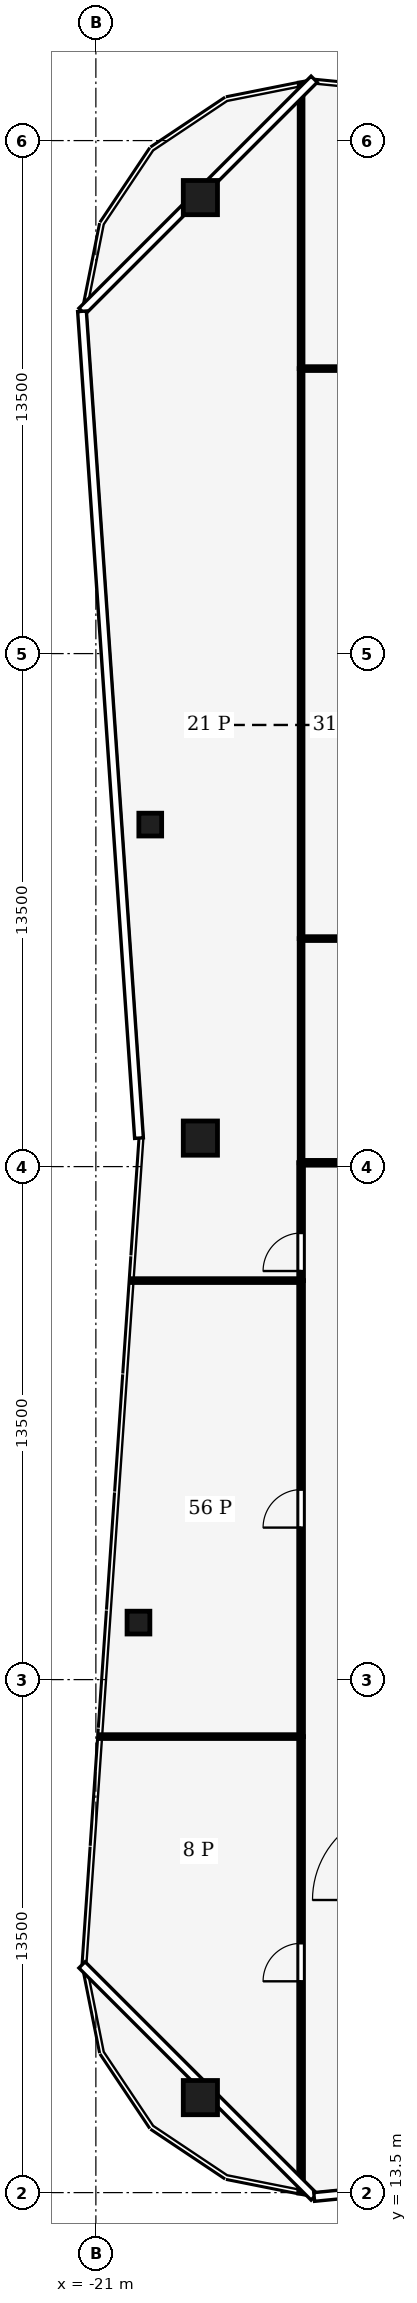
"""IFC4 building model, lengths in metres.
Left out: names, types, materials, properties, quantities, classifications, styles, units other than length and angle.
Written with IfcOpenShell. Run it as: python <this file> out.ifc"""

import sys

from ifc_helpers import new_model, si_unit, direction, frame, frame_2d, origin, origin_2d, place, context, subcontext, project, spatial, rectangle, hollow_rectangle, extrude, element, fill, save


model = new_model("IFC4")
c1 = context("Model", 3, precision=1e-05, world=origin(), true_north=direction((0.0, 1.0)))
c2 = subcontext(c1, "Body", "Model", "MODEL_VIEW")
j1 = project(units=[si_unit("LENGTHUNIT", "METRE"), si_unit("PLANEANGLEUNIT", "RADIAN")], contexts=[c1])
p1 = place(None, origin())
s1 = spatial("IfcSite", under=j1, at=p1, CompositionType="ELEMENT")
p2 = place(p1, origin())
s2 = spatial("IfcBuilding", under=s1, at=p2, CompositionType="ELEMENT")
p3 = place(p2, frame((0.0, 0.0, 334.0)))
s3 = spatial("IfcBuildingStorey", under=s2, at=p3, CompositionType="ELEMENT", Elevation=334.0)
for number, where, z_axis, x_axis in (
    (1, (-18.25, 66.0, 0.0), (0.0, 0.0, 1.0), (1.0, 0.0, 0.0)),
    (2, (-18.25, 16.0, 0.0), (0.0, 0.0, 1.0), (1.0, 0.0, 0.0)),
    (3, (-18.25, 41.25, 0.0), (0.0, 0.0, 1.0), (1.0, 0.0, 0.0)),
):
    element("IfcColumn", number, at=place(p3, frame(where, z_axis=z_axis, x_axis=x_axis)), inside=s3, PredefinedType="COLUMN", context=c2, shape_type="SweptSolid", body=[
        extrude(hollow_rectangle(XDim=0.9, YDim=0.9, WallThickness=0.04, at=origin_2d()), origin(), (0.0, 0.0, 1.0), 6.5),
    ])
for number, where, z_axis, x_axis in (
    (4, (-19.879, 28.5, 0.0), (0.0, 0.0, 1.0), (1.0, 0.0, 0.0)),
    (5, (-19.569, 49.5, 0.0), (0.0, 0.0, 1.0), (1.0, 0.0, 0.0)),
):
    element("IfcColumn", number, at=place(p3, frame(where, z_axis=z_axis, x_axis=x_axis)), inside=s3, PredefinedType="COLUMN", context=c2, shape_type="SweptSolid", body=[
        extrude(hollow_rectangle(XDim=0.6, YDim=0.6, WallThickness=0.025, at=origin_2d()), origin(), (0.0, 0.0, 1.0), 6.5),
    ])
p4 = place(p3, frame((-15.6, 13.49, 0.0), z_axis=(0.0, 0.0, 1.0), x_axis=(0.0, 1.0, 0.0)))
e6 = element("IfcWall", 6, at=p4, inside=s3, PredefinedType="PARTITIONING", context=c2, shape_type="SweptSolid", body=[
    extrude(rectangle(XDim=12.01, YDim=0.125, at=frame_2d((6.005, 0.0))), origin(), (0.0, 0.0, 1.0), 5.41),
])
p5 = place(p4, frame((5.571, 0.0, 0.0)))
e7 = element("IfcOpeningElement", 7, at=p5, cuts=e6, PredefinedType="OPENING", context=c2, shape_type="SweptSolid", body=[
    extrude(rectangle(XDim=1.0, YDim=2.1, at=frame_2d((0.5, 1.05))), frame((0.0, 0.073, 0.0), z_axis=(0.0, -1.0, 0.0), x_axis=(1.0, 0.0, 0.0)), (0.0, 0.0, 1.0), 0.145),
])
p6 = place(p3, frame((-15.6, 25.5, 0.0), z_axis=(0.0, 0.0, 1.0), x_axis=(0.0, 1.0, 0.0)))
e8 = element("IfcWall", 8, at=p6, inside=s3, PredefinedType="PARTITIONING", context=c2, shape_type="SweptSolid", body=[
    extrude(rectangle(XDim=12.0, YDim=0.125, at=frame_2d((6.0, 0.0))), origin(), (0.0, 0.0, 1.0), 6.02),
])
p7 = place(p6, frame((5.5, 0.0, 0.0)))
e9 = element("IfcOpeningElement", 9, at=p7, cuts=e8, PredefinedType="OPENING", context=c2, shape_type="SweptSolid", body=[
    extrude(rectangle(XDim=1.0, YDim=2.1, at=frame_2d((0.5, 1.05))), frame((0.0, 0.073, 0.0), z_axis=(0.0, -1.0, 0.0), x_axis=(1.0, 0.0, 0.0)), (0.0, 0.0, 1.0), 0.145),
])
p8 = place(p3, frame((-15.6, 37.5, 0.0), z_axis=(0.0, 0.0, 1.0), x_axis=(0.0, 1.0, 0.0)))
e10 = element("IfcWall", 10, at=p8, inside=s3, PredefinedType="PARTITIONING", context=c2, shape_type="SweptSolid", body=[
    extrude(rectangle(XDim=3.104, YDim=0.125, at=frame_2d((1.552, 0.0))), origin(), (0.0, 0.0, 1.0), 5.62),
])
p9 = place(p8, frame((0.252, 0.0, 0.0)))
e11 = element("IfcOpeningElement", 11, at=p9, cuts=e10, PredefinedType="OPENING", context=c2, shape_type="SweptSolid", body=[
    extrude(rectangle(XDim=1.0, YDim=2.1, at=frame_2d((0.5, 1.05))), frame((0.0, 0.073, 0.0), z_axis=(0.0, -1.0, 0.0), x_axis=(1.0, 0.0, 0.0)), (0.0, 0.0, 1.0), 0.145),
])
p10 = place(p3, frame((-15.6, 40.6, 0.0), z_axis=(0.0, 0.0, 1.0), x_axis=(1.0, 0.0, 0.0)))
e12 = element("IfcWall", 12, at=p10, inside=s3, PredefinedType="PARTITIONING", context=c2, shape_type="SweptSolid", body=[
    extrude(rectangle(XDim=9.6, YDim=0.125, at=frame_2d((4.8, 0.0))), origin(), (0.0, 0.0, 1.0), 5.87),
])
p11 = place(p10, frame((4.3, 0.0, 0.0)))
e13 = element("IfcOpeningElement", 13, at=p11, cuts=e12, PredefinedType="OPENING", context=c2, shape_type="SweptSolid", body=[
    extrude(rectangle(XDim=1.0, YDim=2.1, at=frame_2d((0.5, 1.05))), frame((0.0, 0.073, 0.0), z_axis=(0.0, -1.0, 0.0), x_axis=(1.0, 0.0, 0.0)), (0.0, 0.0, 1.0), 0.145),
])
p12 = place(p3, frame((-15.6, 25.5, 0.0), z_axis=(0.0, 0.0, 1.0), x_axis=(-1.0, 0.0, 0.0)))
e14 = element("IfcWall", 14, at=p12, inside=s3, PredefinedType="PARTITIONING", context=c2, shape_type="SweptSolid", body=[
    extrude(rectangle(XDim=5.316, YDim=0.1, at=frame_2d((2.658, 0.0))), origin(), (0.0, 0.0, 1.0), 5.52),
])
p13 = place(p3, frame((-15.6, 37.5, 0.0), z_axis=(0.0, 0.0, 1.0), x_axis=(-1.0, 0.0, 0.0)))
e15 = element("IfcWall", 15, at=p13, inside=s3, PredefinedType="PARTITIONING", context=c2, shape_type="SweptSolid", body=[
    extrude(rectangle(XDim=4.489, YDim=0.1, at=frame_2d((2.244, 0.0))), origin(), (0.0, 0.0, 1.0), 5.52),
])
p14 = place(p3, frame((-15.6, 40.6, 0.0), z_axis=(0.0, 0.0, 1.0), x_axis=(0.0, 1.0, 0.0)))
e16 = element("IfcWall", 16, at=p14, inside=s3, PredefinedType="PARTITIONING", context=c2, shape_type="SweptSolid", body=[
    extrude(rectangle(XDim=5.9, YDim=0.1, at=frame_2d((2.95, 0.0))), origin(), (0.0, 0.0, 1.0), 6.35),
])
p15 = place(p3, frame((-15.6, 46.5, 0.0), z_axis=(0.0, 0.0, 1.0), x_axis=(0.0, 1.0, 0.0)))
e17 = element("IfcWall", 17, at=p15, inside=s3, PredefinedType="PARTITIONING", context=c2, shape_type="SweptSolid", body=[
    extrude(rectangle(XDim=15.0, YDim=0.1, at=frame_2d((7.5, 0.0))), origin(), (0.0, 0.0, 1.0), 5.83),
])
p16 = place(p3, frame((-15.6, 61.5, 0.0), z_axis=(0.0, 0.0, 1.0), x_axis=(0.0, 1.0, 0.0)))
e18 = element("IfcWall", 18, at=p16, inside=s3, PredefinedType="PARTITIONING", context=c2, shape_type="SweptSolid", body=[
    extrude(rectangle(XDim=7.51, YDim=0.1, at=frame_2d((3.755, 0.0))), origin(), (0.0, 0.0, 1.0), 5.41),
])
p17 = place(p3, frame((-5.996, 46.5, 0.0), z_axis=(0.0, 0.0, 1.0), x_axis=(-1.0, 0.0, 0.0)))
e19 = element("IfcWall", 19, at=p17, inside=s3, PredefinedType="PARTITIONING", context=c2, shape_type="SweptSolid", body=[
    extrude(rectangle(XDim=9.604, YDim=0.1, at=frame_2d((4.802, 0.0))), origin(), (0.0, 0.0, 1.0), 5.87),
])
p18 = place(p3, frame((-15.6, 61.5, 0.0), z_axis=(0.0, 0.0, 1.0), x_axis=(1.0, 0.0, 0.0)))
e20 = element("IfcWall", 20, at=p18, inside=s3, PredefinedType="PARTITIONING", context=c2, shape_type="SweptSolid", body=[
    extrude(rectangle(XDim=9.6, YDim=0.1, at=frame_2d((4.8, 0.0))), origin(), (0.0, 0.0, 1.0), 5.72),
])
p19 = place(p18, frame((4.3, 0.0, 0.0)))
e21 = element("IfcOpeningElement", 21, at=p19, cuts=e20, PredefinedType="OPENING", context=c2, shape_type="SweptSolid", body=[
    extrude(rectangle(XDim=1.0, YDim=2.1, at=frame_2d((0.5, 1.05))), frame((0.0, 0.06, 0.0), z_axis=(0.0, -1.0, 0.0), x_axis=(1.0, 0.0, 0.0)), (0.0, 0.0, 1.0), 0.12),
])
p20 = place(p5, origin())
e22 = element("IfcDoor", 22, at=p20, inside=s3, OperationType="SINGLE_SWING_RIGHT", PredefinedType="DOOR", context=c2, shape_type="SweptSolid", body=[
    extrude(rectangle(XDim=1.0, YDim=2.1, at=frame_2d((0.5, 1.05))), frame((0.0, 0.025, 0.0), z_axis=(0.0, -1.0, 0.0), x_axis=(1.0, 0.0, 0.0)), (0.0, 0.0, 1.0), 0.05),
])
fill(e7, e22)
p21 = place(p7, origin())
e23 = element("IfcDoor", 23, at=p21, inside=s3, OperationType="SINGLE_SWING_RIGHT", PredefinedType="DOOR", context=c2, shape_type="SweptSolid", body=[
    extrude(rectangle(XDim=1.0, YDim=2.1, at=frame_2d((0.5, 1.05))), frame((0.0, 0.025, 0.0), z_axis=(0.0, -1.0, 0.0), x_axis=(1.0, 0.0, 0.0)), (0.0, 0.0, 1.0), 0.05),
])
fill(e9, e23)
p22 = place(p9, origin())
e24 = element("IfcDoor", 24, at=p22, inside=s3, OperationType="SINGLE_SWING_LEFT", PredefinedType="DOOR", context=c2, shape_type="SweptSolid", body=[
    extrude(rectangle(XDim=1.0, YDim=2.1, at=frame_2d((0.5, 1.05))), frame((0.0, 0.025, 0.0), z_axis=(0.0, -1.0, 0.0), x_axis=(1.0, 0.0, 0.0)), (0.0, 0.0, 1.0), 0.05),
])
fill(e11, e24)
save(model, sys.argv[1])
